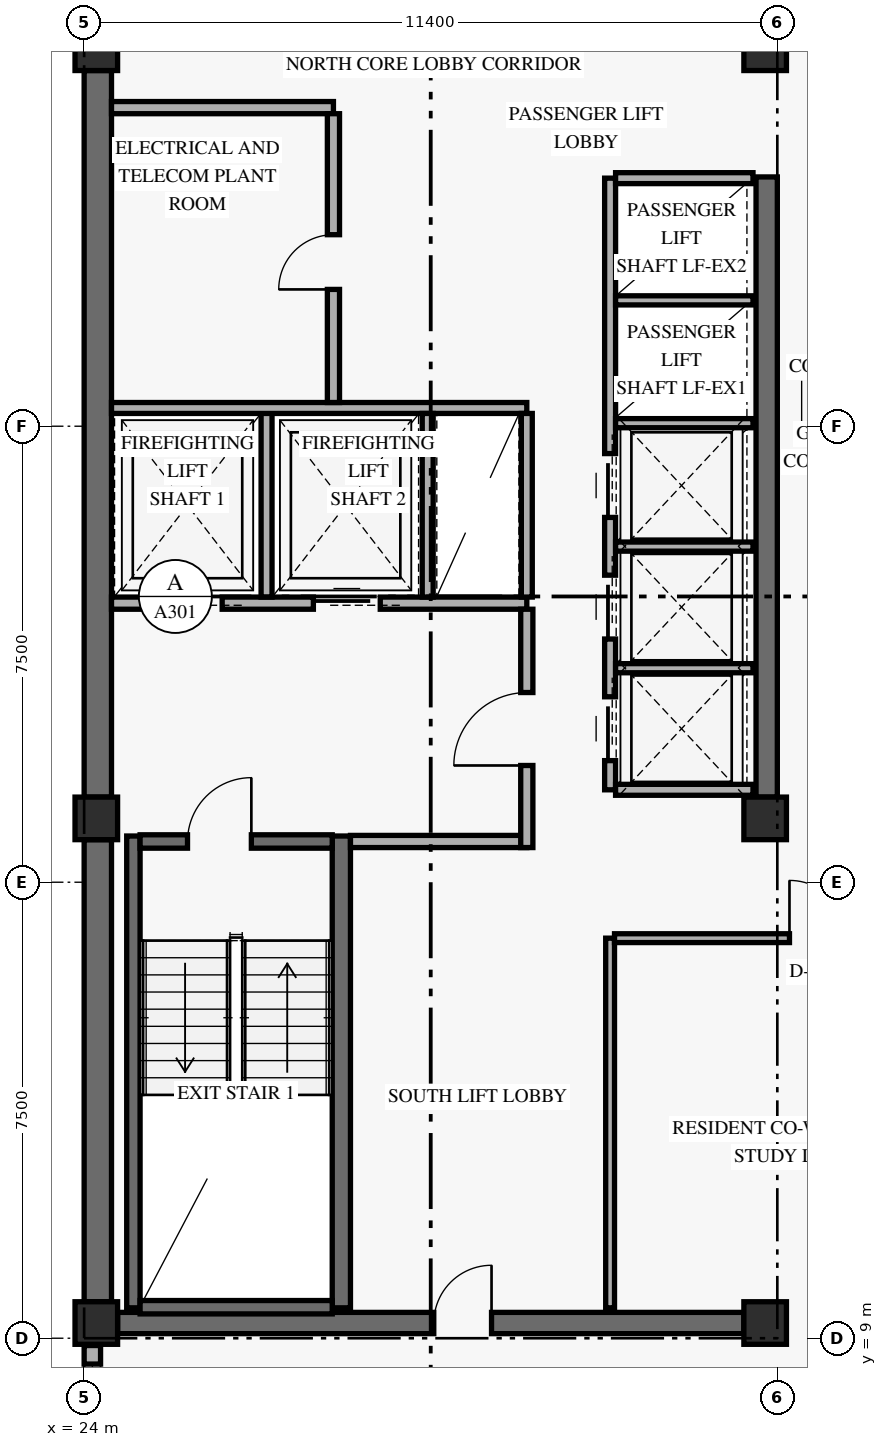
"""IFC4 building model, lengths in metres.
Left out: names, types, materials, properties, quantities, classifications, styles, units other than length and angle.
Written with IfcOpenShell. Run it as: python <this file> out.ifc"""

import sys

from ifc_helpers import new_model, si_unit, direction, frame, frame_2d, origin, origin_2d, place, context, subcontext, project, spatial, rectangle, extrude, element, fill, save


model = new_model("IFC4")
c1 = context("Model", 3, precision=1e-05, world=origin(), true_north=direction((0.0, 1.0)))
c2 = subcontext(c1, "Body", "Model", "MODEL_VIEW")
j1 = project(units=[si_unit("LENGTHUNIT", "METRE"), si_unit("PLANEANGLEUNIT", "RADIAN")], contexts=[c1])
p1 = place(None, origin())
s1 = spatial("IfcSite", under=j1, at=p1, CompositionType="ELEMENT")
p2 = place(p1, origin())
s2 = spatial("IfcBuilding", under=s1, at=p2, CompositionType="ELEMENT")
p3 = place(p2, frame((0.0, 0.0, 227.4)))
s3 = spatial("IfcBuildingStorey", under=s2, at=p3, CompositionType="ELEMENT", Elevation=227.4)
p4 = place(p3, frame((24.225, 9.6, 0.0), z_axis=(0.0, 0.0, 1.0), x_axis=(0.0, 1.0, 0.0)))
e1 = element("IfcWall", 1, at=p4, inside=s3, PredefinedType="SHEAR", context=c2, shape_type="SweptSolid", body=[
    extrude(rectangle(XDim=7.6, YDim=0.45, at=frame_2d((3.8, 0.0))), origin(), (0.0, 0.0, 1.0), 2.811),
])
p5 = place(p3, frame((24.225, 17.9, 0.0), z_axis=(0.0, 0.0, 1.0), x_axis=(0.0, 1.0, 0.0)))
e2 = element("IfcWall", 2, at=p5, inside=s3, PredefinedType="SHEAR", context=c2, shape_type="SweptSolid", body=[
    extrude(rectangle(XDim=11.95, YDim=0.45, at=frame_2d((5.975, 0.0))), origin(), (0.0, 0.0, 1.0), 2.811),
])
p6 = place(p3, frame((35.225, 17.9, 0.0), z_axis=(0.0, 0.0, 1.0), x_axis=(0.0, 1.0, 0.0)))
e3 = element("IfcWall", 3, at=p6, inside=s3, PredefinedType="SHEAR", context=c2, shape_type="SweptSolid", body=[
    extrude(rectangle(XDim=10.2, YDim=0.35, at=frame_2d((5.1, 0.0))), origin(), (0.0, 0.0, 1.0), 2.811),
])
p7 = place(p3, frame((24.55, 9.25, 0.0), z_axis=(0.0, 0.0, 1.0), x_axis=(1.0, 0.0, 0.0)))
e4 = element("IfcWall", 4, at=p7, inside=s3, PredefinedType="SHEAR", context=c2, shape_type="SweptSolid", body=[
    extrude(rectangle(XDim=10.3, YDim=0.35, at=frame_2d((5.15, 0.0))), origin(), (0.0, 0.0, 1.0), 3.35),
])
p8 = place(p7, frame((5.2, 0.0, 0.0)))
e5 = element("IfcOpeningElement", 5, at=p8, cuts=e4, PredefinedType="OPENING", context=c2, shape_type="SweptSolid", body=[
    extrude(rectangle(XDim=0.95, YDim=2.15, at=frame_2d((0.475, 1.075))), frame((0.0, 0.185, 0.0), z_axis=(0.0, -1.0, 0.0), x_axis=(1.0, 0.0, 0.0)), (0.0, 0.0, 1.0), 0.37),
])
p9 = place(p3, frame((24.81, 9.5, 0.0), z_axis=(0.0, 0.0, 1.0), x_axis=(0.0, 1.0, 0.0)))
e6 = element("IfcWall", 6, at=p9, inside=s3, PredefinedType="SHEAR", context=c2, shape_type="SweptSolid", body=[
    extrude(rectangle(XDim=7.76, YDim=0.22, at=frame_2d((3.88, 0.0))), origin(), (0.0, 0.0, 1.0), 3.35),
])
p10 = place(p3, frame((28.23, 9.5, 0.0), z_axis=(0.0, 0.0, 1.0), x_axis=(0.0, 1.0, 0.0)))
e7 = element("IfcWall", 7, at=p10, inside=s3, PredefinedType="SHEAR", context=c2, shape_type="SweptSolid", body=[
    extrude(rectangle(XDim=7.76, YDim=0.3, at=frame_2d((3.88, 0.0))), origin(), (0.0, 0.0, 1.0), 3.35),
])
p11 = place(p3, frame((24.92, 9.51, 0.0), z_axis=(0.0, 0.0, 1.0), x_axis=(1.0, 0.0, 0.0)))
e8 = element("IfcWall", 8, at=p11, inside=s3, PredefinedType="SHEAR", context=c2, shape_type="SweptSolid", body=[
    extrude(rectangle(XDim=3.16, YDim=0.22, at=frame_2d((1.58, 0.0))), origin(), (0.0, 0.0, 1.0), 3.35),
])
p12 = place(p3, frame((24.92, 17.17, 0.0), z_axis=(0.0, 0.0, 1.0), x_axis=(1.0, 0.0, 0.0)))
e9 = element("IfcWall", 9, at=p12, inside=s3, PredefinedType="SHEAR", context=c2, shape_type="SweptSolid", body=[
    extrude(rectangle(XDim=3.16, YDim=0.22, at=frame_2d((1.58, 0.0))), origin(), (0.0, 0.0, 1.0), 3.35),
])
p13 = place(p12, frame((0.78, 0.0, 0.0)))
e10 = element("IfcOpeningElement", 10, at=p13, cuts=e9, PredefinedType="OPENING", context=c2, shape_type="SweptSolid", body=[
    extrude(rectangle(XDim=1.05, YDim=2.15, at=frame_2d((0.525, 1.075))), frame((0.0, 0.12, 0.0), z_axis=(0.0, -1.0, 0.0), x_axis=(1.0, 0.0, 0.0)), (0.0, 0.0, 1.0), 0.24),
])
for number, where, z_axis, x_axis in (
    (11, (24.2, 9.25, 0.0), (0.0, 0.0, 1.0), (1.0, 0.0, 0.0)),
    (12, (24.2, 17.55, 0.0), (0.0, 0.0, 1.0), (1.0, 0.0, 0.0)),
    (13, (24.2, 30.2, 0.0), (0.0, 0.0, 1.0), (1.0, 0.0, 0.0)),
    (14, (35.2, 9.25, 0.0), (0.0, 0.0, 1.0), (1.0, 0.0, 0.0)),
    (15, (35.2, 17.55, 0.0), (0.0, 0.0, 1.0), (1.0, 0.0, 0.0)),
    (16, (35.2, 30.2, 0.0), (0.0, 0.0, 1.0), (1.0, 0.0, 0.0)),
):
    element("IfcColumn", number, at=place(p3, frame(where, z_axis=z_axis, x_axis=x_axis)), inside=s3, PredefinedType="COLUMN", context=c2, shape_type="SweptSolid", body=[
        extrude(rectangle(XDim=0.7, YDim=0.7, at=origin_2d()), origin(), (0.0, 0.0, 1.0), 3.6),
    ])
p14 = place(p3, frame((24.135, 7.32, 0.0), z_axis=(0.0, 0.0, 1.0), x_axis=(0.0, 1.0, 0.0)))
e17 = element("IfcWall", 17, at=p14, inside=s3, PredefinedType="SOLIDWALL", context=c2, shape_type="SweptSolid", body=[
    extrude(rectangle(XDim=1.56, YDim=0.27, at=frame_2d((0.78, 0.0))), origin(), (0.0, 0.0, 1.0), 2.793),
])
p15 = place(p14, frame((0.305, 0.0, 0.85)))
e18 = element("IfcOpeningElement", 18, at=p15, cuts=e17, PredefinedType="OPENING", context=c2, shape_type="SweptSolid", body=[
    extrude(rectangle(XDim=0.95, YDim=1.5, at=frame_2d((0.475, 0.75))), frame((0.0, 0.145, 0.0), z_axis=(0.0, -1.0, 0.0), x_axis=(1.0, 0.0, 0.0)), (0.0, 0.0, 1.0), 0.29),
])
p16 = place(p3, frame((24.45, 21.09, 0.0), z_axis=(0.0, 0.0, 1.0), x_axis=(1.0, 0.0, 0.0)))
e19 = element("IfcWall", 19, at=p16, inside=s3, PredefinedType="STANDARD", context=c2, shape_type="SweptSolid", body=[
    extrude(rectangle(XDim=6.83, YDim=0.2, at=frame_2d((3.415, 0.0))), origin(), (0.0, 0.0, 1.0), 3.35),
])
p17 = place(p16, frame((0.72, 0.0, 0.0)))
e20 = element("IfcOpeningElement", 20, at=p17, cuts=e19, PredefinedType="OPENING", context=c2, shape_type="SweptSolid", body=[
    extrude(rectangle(XDim=1.1, YDim=2.2, at=frame_2d((0.55, 1.1))), frame((0.0, 0.11, 0.0), z_axis=(0.0, -1.0, 0.0), x_axis=(1.0, 0.0, 0.0)), (0.0, 0.0, 1.0), 0.22),
])
p18 = place(p16, frame((3.32, 0.0, 0.0)))
e21 = element("IfcOpeningElement", 21, at=p18, cuts=e19, PredefinedType="OPENING", context=c2, shape_type="SweptSolid", body=[
    extrude(rectangle(XDim=1.1, YDim=2.2, at=frame_2d((0.55, 1.1))), frame((0.0, 0.11, 0.0), z_axis=(0.0, -1.0, 0.0), x_axis=(1.0, 0.0, 0.0)), (0.0, 0.0, 1.0), 0.22),
])
p19 = place(p3, frame((28.38, 17.17, 0.0), z_axis=(0.0, 0.0, 1.0), x_axis=(1.0, 0.0, 0.0)))
e22 = element("IfcWall", 22, at=p19, inside=s3, PredefinedType="STANDARD", context=c2, shape_type="SweptSolid", body=[
    extrude(rectangle(XDim=2.9, YDim=0.2, at=frame_2d((1.45, 0.0))), origin(), (0.0, 0.0, 1.0), 3.35),
])
p20 = place(p3, frame((31.28, 17.07, 0.0), z_axis=(0.0, 0.0, 1.0), x_axis=(0.0, 1.0, 0.0)))
e23 = element("IfcWall", 23, at=p20, inside=s3, PredefinedType="STANDARD", context=c2, shape_type="SweptSolid", body=[
    extrude(rectangle(XDim=3.92, YDim=0.2, at=frame_2d((1.96, 0.0))), origin(), (0.0, 0.0, 1.0), 2.793),
])
p21 = place(p20, frame((1.35, 0.0, 0.0)))
e24 = element("IfcOpeningElement", 24, at=p21, cuts=e23, PredefinedType="OPENING", context=c2, shape_type="SweptSolid", body=[
    extrude(rectangle(XDim=1.2, YDim=2.15, at=frame_2d((0.6, 1.075))), frame((0.0, 0.11, 0.0), z_axis=(0.0, -1.0, 0.0), x_axis=(1.0, 0.0, 0.0)), (0.0, 0.0, 1.0), 0.22),
])
p22 = place(p3, frame((27.0, 21.19, 0.0), z_axis=(0.0, 0.0, 1.0), x_axis=(0.0, 1.0, 0.0)))
e25 = element("IfcWall", 25, at=p22, inside=s3, PredefinedType="STANDARD", context=c2, shape_type="SweptSolid", body=[
    extrude(rectangle(XDim=3.11, YDim=0.18, at=frame_2d((1.555, 0.0))), origin(), (0.0, 0.0, 1.0), 3.35),
])
p23 = place(p3, frame((24.45, 24.3, 0.0), z_axis=(0.0, 0.0, 1.0), x_axis=(1.0, 0.0, 0.0)))
e26 = element("IfcWall", 26, at=p23, inside=s3, PredefinedType="STANDARD", context=c2, shape_type="SweptSolid", body=[
    extrude(rectangle(XDim=6.83, YDim=0.18, at=frame_2d((3.415, 0.0))), origin(), (0.0, 0.0, 1.0), 3.35),
])
for number, where, z_axis, x_axis in (
    (27, (29.65, 21.19, 0.0), (0.0, 0.0, 1.0), (0.0, 1.0, 0.0)),
    (28, (31.28, 21.19, 0.0), (0.0, 0.0, 1.0), (0.0, 1.0, 0.0)),
):
    element("IfcWall", number, at=place(p3, frame(where, z_axis=z_axis, x_axis=x_axis)), inside=s3, PredefinedType="STANDARD", context=c2, shape_type="SweptSolid", body=[
        extrude(rectangle(XDim=3.02, YDim=0.18, at=frame_2d((1.51, 0.0))), origin(), (0.0, 0.0, 1.0), 3.35),
    ])
p24 = place(p3, frame((24.45, 29.24, 0.0), z_axis=(0.0, 0.0, 1.0), x_axis=(1.0, 0.0, 0.0)))
e29 = element("IfcWall", 29, at=p24, inside=s3, PredefinedType="STANDARD", context=c2, shape_type="SweptSolid", body=[
    extrude(rectangle(XDim=3.65, YDim=0.2, at=frame_2d((1.825, 0.0))), origin(), (0.0, 0.0, 1.0), 3.35),
])
p25 = place(p3, frame((28.1, 24.39, 0.0), z_axis=(0.0, 0.0, 1.0), x_axis=(0.0, 1.0, 0.0)))
e30 = element("IfcWall", 30, at=p25, inside=s3, PredefinedType="STANDARD", context=c2, shape_type="SweptSolid", body=[
    extrude(rectangle(XDim=4.75, YDim=0.2, at=frame_2d((2.375, 0.0))), origin(), (0.0, 0.0, 1.0), 3.35),
])
p26 = place(p25, frame((1.86, 0.0, 0.0)))
e31 = element("IfcOpeningElement", 31, at=p26, cuts=e30, PredefinedType="OPENING", context=c2, shape_type="SweptSolid", body=[
    extrude(rectangle(XDim=0.9, YDim=2.1, at=frame_2d((0.45, 1.05))), frame((0.0, 0.11, 0.0), z_axis=(0.0, -1.0, 0.0), x_axis=(1.0, 0.0, 0.0)), (0.0, 0.0, 1.0), 0.22),
])
p27 = place(p3, frame((32.65, 18.02, 0.0), z_axis=(0.0, 0.0, 1.0), x_axis=(0.0, 1.0, 0.0)))
e32 = element("IfcWall", 32, at=p27, inside=s3, PredefinedType="STANDARD", context=c2, shape_type="SweptSolid", body=[
    extrude(rectangle(XDim=10.06, YDim=0.18, at=frame_2d((5.03, 0.0))), origin(), (0.0, 0.0, 1.0), 3.35),
])
p28 = place(p27, frame((0.48, 0.0, 0.0)))
e33 = element("IfcOpeningElement", 33, at=p28, cuts=e32, PredefinedType="OPENING", context=c2, shape_type="SweptSolid", body=[
    extrude(rectangle(XDim=1.05, YDim=2.2, at=frame_2d((0.525, 1.1))), frame((0.0, 0.1, 0.0), z_axis=(0.0, -1.0, 0.0), x_axis=(1.0, 0.0, 0.0)), (0.0, 0.0, 1.0), 0.2),
])
p29 = place(p27, frame((2.48, 0.0, 0.0)))
e34 = element("IfcOpeningElement", 34, at=p29, cuts=e32, PredefinedType="OPENING", context=c2, shape_type="SweptSolid", body=[
    extrude(rectangle(XDim=1.05, YDim=2.2, at=frame_2d((0.525, 1.1))), frame((0.0, 0.1, 0.0), z_axis=(0.0, -1.0, 0.0), x_axis=(1.0, 0.0, 0.0)), (0.0, 0.0, 1.0), 0.2),
])
p30 = place(p27, frame((4.48, 0.0, 0.0)))
e35 = element("IfcOpeningElement", 35, at=p30, cuts=e32, PredefinedType="OPENING", context=c2, shape_type="SweptSolid", body=[
    extrude(rectangle(XDim=1.05, YDim=2.2, at=frame_2d((0.525, 1.1))), frame((0.0, 0.1, 0.0), z_axis=(0.0, -1.0, 0.0), x_axis=(1.0, 0.0, 0.0)), (0.0, 0.0, 1.0), 0.2),
])
for number, where, z_axis, x_axis in (
    (36, (32.74, 18.02, 0.0), (0.0, 0.0, 1.0), (1.0, 0.0, 0.0)),
    (37, (32.74, 28.08, 0.0), (0.0, 0.0, 1.0), (1.0, 0.0, 0.0)),
):
    element("IfcWall", number, at=place(p3, frame(where, z_axis=z_axis, x_axis=x_axis)), inside=s3, PredefinedType="STANDARD", context=c2, shape_type="SweptSolid", body=[
        extrude(rectangle(XDim=2.26, YDim=0.18, at=frame_2d((1.13, 0.0))), origin(), (0.0, 0.0, 1.0), 3.35),
    ])
for number, where, z_axis, x_axis in (
    (38, (32.74, 20.02, 0.0), (0.0, 0.0, 1.0), (1.0, 0.0, 0.0)),
    (39, (32.74, 22.02, 0.0), (0.0, 0.0, 1.0), (1.0, 0.0, 0.0)),
    (40, (32.74, 24.05, 0.0), (0.0, 0.0, 1.0), (1.0, 0.0, 0.0)),
    (41, (32.74, 26.07, 0.0), (0.0, 0.0, 1.0), (1.0, 0.0, 0.0)),
):
    element("IfcWall", number, at=place(p3, frame(where, z_axis=z_axis, x_axis=x_axis)), inside=s3, PredefinedType="STANDARD", context=c2, shape_type="SweptSolid", body=[
        extrude(rectangle(XDim=2.26, YDim=0.15, at=frame_2d((1.13, 0.0))), origin(), (0.0, 0.0, 1.0), 3.35),
    ])
p31 = place(p3, frame((32.65, 9.5, 0.0), z_axis=(0.0, 0.0, 1.0), x_axis=(0.0, 1.0, 0.0)))
e42 = element("IfcWall", 42, at=p31, inside=s3, PredefinedType="PARTITIONING", context=c2, shape_type="SweptSolid", body=[
    extrude(rectangle(XDim=6.08, YDim=0.145, at=frame_2d((3.04, 0.0))), origin(), (0.0, 0.0, 1.0), 3.35),
])
p32 = place(p3, frame((32.722, 15.58, 0.0), z_axis=(0.0, 0.0, 1.0), x_axis=(1.0, 0.0, 0.0)))
e43 = element("IfcWall", 43, at=p32, inside=s3, PredefinedType="PARTITIONING", context=c2, shape_type="SweptSolid", body=[
    extrude(rectangle(XDim=5.628, YDim=0.145, at=frame_2d((2.814, 0.0))), origin(), (0.0, 0.0, 1.0), 2.793),
])
p33 = place(p32, frame((2.877, 0.0, 0.0)))
e44 = element("IfcOpeningElement", 44, at=p33, cuts=e43, PredefinedType="OPENING", context=c2, shape_type="SweptSolid", body=[
    extrude(rectangle(XDim=0.95, YDim=2.15, at=frame_2d((0.475, 1.075))), frame((0.0, 0.083, 0.0), z_axis=(0.0, -1.0, 0.0), x_axis=(1.0, 0.0, 0.0)), (0.0, 0.0, 1.0), 0.165),
])
p34 = place(p15, origin())
e45 = element("IfcWindow", 45, at=p34, inside=s3, PartitioningType="SINGLE_PANEL", PredefinedType="WINDOW", context=c2, shape_type="SweptSolid", body=[
    extrude(rectangle(XDim=0.95, YDim=1.5, at=frame_2d((0.475, 0.75))), frame((0.0, 0.03, 0.0), z_axis=(0.0, -1.0, 0.0), x_axis=(1.0, 0.0, 0.0)), (0.0, 0.0, 1.0), 0.06),
])
fill(e18, e45)
p35 = place(p13, frame((1.05, 0.0, 0.0), z_axis=(0.0, 0.0, 1.0), x_axis=(-1.0, 0.0, 0.0)))
e46 = element("IfcDoor", 46, at=p35, inside=s3, OperationType="SINGLE_SWING_LEFT", PredefinedType="DOOR", context=c2, shape_type="SweptSolid", body=[
    extrude(rectangle(XDim=1.05, YDim=2.15, at=frame_2d((0.525, 1.075))), frame((0.0, 0.025, 0.0), z_axis=(0.0, -1.0, 0.0), x_axis=(1.0, 0.0, 0.0)), (0.0, 0.0, 1.0), 0.05),
])
fill(e10, e46)
p36 = place(p17, origin())
e47 = element("IfcDoor", 47, at=p36, inside=s3, OperationType="SLIDING_TO_LEFT", PredefinedType="DOOR", context=c2, shape_type="SweptSolid", body=[
    extrude(rectangle(XDim=1.1, YDim=2.2, at=frame_2d((0.55, 1.1))), frame((0.0, 0.025, 0.0), z_axis=(0.0, -1.0, 0.0), x_axis=(1.0, 0.0, 0.0)), (0.0, 0.0, 1.0), 0.05),
])
fill(e20, e47)
p37 = place(p18, origin())
e48 = element("IfcDoor", 48, at=p37, inside=s3, OperationType="SLIDING_TO_LEFT", PredefinedType="DOOR", context=c2, shape_type="SweptSolid", body=[
    extrude(rectangle(XDim=1.1, YDim=2.2, at=frame_2d((0.55, 1.1))), frame((0.0, 0.025, 0.0), z_axis=(0.0, -1.0, 0.0), x_axis=(1.0, 0.0, 0.0)), (0.0, 0.0, 1.0), 0.05),
])
fill(e21, e48)
p38 = place(p21, origin())
e49 = element("IfcDoor", 49, at=p38, inside=s3, OperationType="SINGLE_SWING_LEFT", PredefinedType="DOOR", context=c2, shape_type="SweptSolid", body=[
    extrude(rectangle(XDim=1.2, YDim=2.15, at=frame_2d((0.6, 1.075))), frame((0.0, 0.025, 0.0), z_axis=(0.0, -1.0, 0.0), x_axis=(1.0, 0.0, 0.0)), (0.0, 0.0, 1.0), 0.05),
])
fill(e24, e49)
p39 = place(p26, origin())
e50 = element("IfcDoor", 50, at=p39, inside=s3, OperationType="SINGLE_SWING_LEFT", PredefinedType="DOOR", context=c2, shape_type="SweptSolid", body=[
    extrude(rectangle(XDim=0.9, YDim=2.1, at=frame_2d((0.45, 1.05))), frame((0.0, 0.025, 0.0), z_axis=(0.0, -1.0, 0.0), x_axis=(1.0, 0.0, 0.0)), (0.0, 0.0, 1.0), 0.05),
])
fill(e31, e50)
p40 = place(p28, origin())
e51 = element("IfcDoor", 51, at=p40, inside=s3, OperationType="SLIDING_TO_LEFT", PredefinedType="DOOR", context=c2, shape_type="SweptSolid", body=[
    extrude(rectangle(XDim=1.05, YDim=2.2, at=frame_2d((0.525, 1.1))), frame((0.0, 0.025, 0.0), z_axis=(0.0, -1.0, 0.0), x_axis=(1.0, 0.0, 0.0)), (0.0, 0.0, 1.0), 0.05),
])
fill(e33, e51)
p41 = place(p29, origin())
e52 = element("IfcDoor", 52, at=p41, inside=s3, OperationType="SLIDING_TO_LEFT", PredefinedType="DOOR", context=c2, shape_type="SweptSolid", body=[
    extrude(rectangle(XDim=1.05, YDim=2.2, at=frame_2d((0.525, 1.1))), frame((0.0, 0.025, 0.0), z_axis=(0.0, -1.0, 0.0), x_axis=(1.0, 0.0, 0.0)), (0.0, 0.0, 1.0), 0.05),
])
fill(e34, e52)
p42 = place(p30, origin())
e53 = element("IfcDoor", 53, at=p42, inside=s3, OperationType="SLIDING_TO_LEFT", PredefinedType="DOOR", context=c2, shape_type="SweptSolid", body=[
    extrude(rectangle(XDim=1.05, YDim=2.2, at=frame_2d((0.525, 1.1))), frame((0.0, 0.025, 0.0), z_axis=(0.0, -1.0, 0.0), x_axis=(1.0, 0.0, 0.0)), (0.0, 0.0, 1.0), 0.05),
])
fill(e35, e53)
p43 = place(p33, origin())
e54 = element("IfcDoor", 54, at=p43, inside=s3, OperationType="SINGLE_SWING_LEFT", PredefinedType="DOOR", context=c2, shape_type="SweptSolid", body=[
    extrude(rectangle(XDim=0.95, YDim=2.15, at=frame_2d((0.475, 1.075))), frame((0.0, 0.025, 0.0), z_axis=(0.0, -1.0, 0.0), x_axis=(1.0, 0.0, 0.0)), (0.0, 0.0, 1.0), 0.05),
])
fill(e44, e54)
p44 = place(p8, frame((0.95, 0.0, 0.0), z_axis=(0.0, 0.0, 1.0), x_axis=(-1.0, 0.0, 0.0)))
e55 = element("IfcDoor", 55, at=p44, inside=s3, OperationType="SINGLE_SWING_LEFT", PredefinedType="DOOR", context=c2, shape_type="SweptSolid", body=[
    extrude(rectangle(XDim=0.95, YDim=2.15, at=frame_2d((0.475, 1.075))), frame((0.0, 0.025, 0.0), z_axis=(0.0, -1.0, 0.0), x_axis=(1.0, 0.0, 0.0)), (0.0, 0.0, 1.0), 0.05),
])
fill(e5, e55)
save(model, sys.argv[1])
